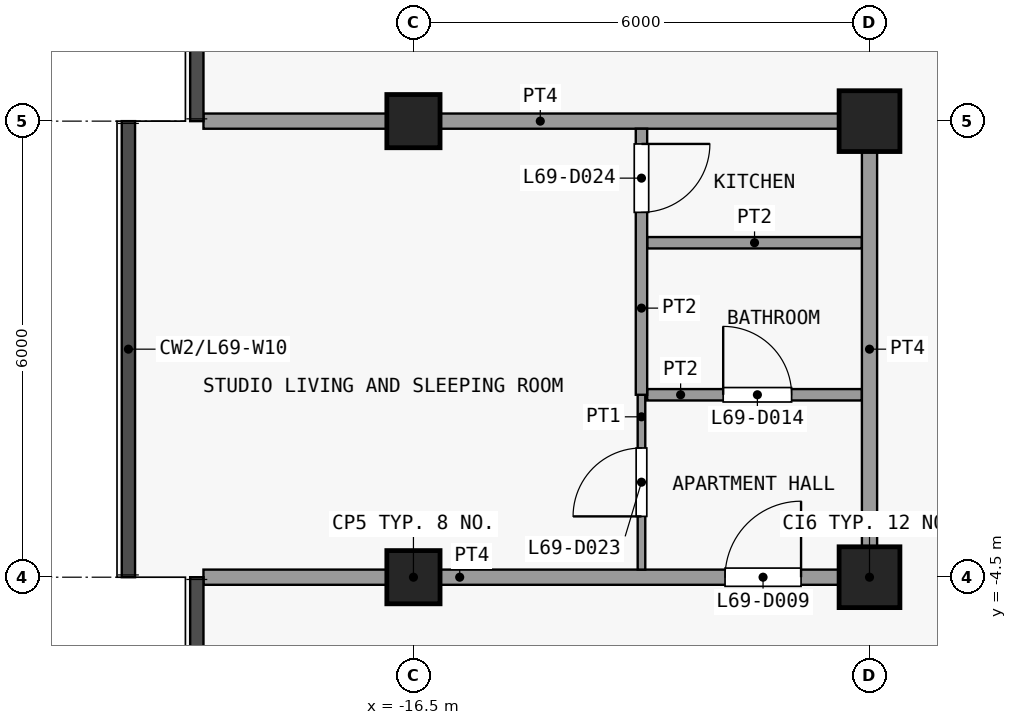
"""IFC4 building model, lengths in metres.
Left out: names, types, materials, properties, quantities, classifications, styles, units other than length and angle.
Written with IfcOpenShell. Run it as: python <this file> out.ifc"""

import sys

from ifc_helpers import new_model, si_unit, direction, frame, frame_2d, origin, origin_2d, place, context, subcontext, project, spatial, rectangle, extrude, element, fill, save


model = new_model("IFC4")
c1 = context("Model", 3, precision=1e-05, world=origin(), true_north=direction((0.0, 1.0)))
c2 = subcontext(c1, "Body", "Model", "MODEL_VIEW")
j1 = project(units=[si_unit("LENGTHUNIT", "METRE"), si_unit("PLANEANGLEUNIT", "RADIAN")], contexts=[c1])
p1 = place(None, origin())
s1 = spatial("IfcSite", under=j1, at=p1, CompositionType="ELEMENT")
p2 = place(p1, origin())
s2 = spatial("IfcBuilding", under=s1, at=p2, CompositionType="ELEMENT")
p3 = place(p2, frame((0.0, 0.0, 273.5)))
s3 = spatial("IfcBuildingStorey", under=s2, at=p3, CompositionType="ELEMENT", Elevation=273.5)
for number, where, z_axis, x_axis in (
    (1, (-16.5, -4.5, 0.0), (0.0, 0.0, 1.0), (1.0, 0.0, 0.0)),
    (2, (-16.5, 1.5, 0.0), (0.0, 0.0, 1.0), (1.0, 0.0, 0.0)),
):
    element("IfcColumn", number, at=place(p3, frame(where, z_axis=z_axis, x_axis=x_axis)), inside=s3, PredefinedType="COLUMN", context=c2, shape_type="SweptSolid", body=[
        extrude(rectangle(XDim=0.7, YDim=0.7, at=origin_2d()), origin(), (0.0, 0.0, 1.0), 3.6),
    ])
for number, where, z_axis, x_axis in (
    (3, (-10.5, -4.5, 0.0), (0.0, 0.0, 1.0), (1.0, 0.0, 0.0)),
    (4, (-10.5, 1.5, 0.0), (0.0, 0.0, 1.0), (1.0, 0.0, 0.0)),
):
    element("IfcColumn", number, at=place(p3, frame(where, z_axis=z_axis, x_axis=x_axis)), inside=s3, PredefinedType="COLUMN", context=c2, shape_type="SweptSolid", body=[
        extrude(rectangle(XDim=0.8, YDim=0.8, at=origin_2d()), origin(), (0.0, 0.0, 1.0), 3.6),
    ])
p4 = place(p3, frame((-19.262, -4.5, 0.0), z_axis=(0.0, 0.0, 1.0), x_axis=(1.0, 0.0, 0.0)))
e5 = element("IfcWall", 5, at=p4, inside=s3, PredefinedType="PARTITIONING", context=c2, shape_type="SweptSolid", body=[
    extrude(rectangle(XDim=8.863, YDim=0.2, at=frame_2d((4.431, 0.0))), origin(), (0.0, 0.0, 1.0), 3.3),
])
p5 = place(p4, frame((6.862, 0.0, 0.0)))
e6 = element("IfcOpeningElement", 6, at=p5, cuts=e5, PredefinedType="OPENING", context=c2, shape_type="SweptSolid", body=[
    extrude(rectangle(XDim=1.0, YDim=2.1, at=frame_2d((0.5, 1.05))), frame((0.0, 0.11, 0.0), z_axis=(0.0, -1.0, 0.0), x_axis=(1.0, 0.0, 0.0)), (0.0, 0.0, 1.0), 0.22),
])
p6 = place(p3, frame((-13.425, -2.1, 0.0), z_axis=(0.0, 0.0, 1.0), x_axis=(1.0, 0.0, 0.0)))
e7 = element("IfcWall", 7, at=p6, inside=s3, PredefinedType="PARTITIONING", context=c2, shape_type="SweptSolid", body=[
    extrude(rectangle(XDim=2.825, YDim=0.15, at=frame_2d((1.413, 0.0))), origin(), (0.0, 0.0, 1.0), 3.3),
])
p7 = place(p6, frame((1.0, 0.0, 0.0)))
e8 = element("IfcOpeningElement", 8, at=p7, cuts=e7, PredefinedType="OPENING", context=c2, shape_type="SweptSolid", body=[
    extrude(rectangle(XDim=0.9, YDim=2.1, at=frame_2d((0.45, 1.05))), frame((0.0, 0.085, 0.0), z_axis=(0.0, -1.0, 0.0), x_axis=(1.0, 0.0, 0.0)), (0.0, 0.0, 1.0), 0.17),
])
p8 = place(p3, frame((-13.425, -0.1, 0.0), z_axis=(0.0, 0.0, 1.0), x_axis=(1.0, 0.0, 0.0)))
e9 = element("IfcWall", 9, at=p8, inside=s3, PredefinedType="PARTITIONING", context=c2, shape_type="SweptSolid", body=[
    extrude(rectangle(XDim=2.825, YDim=0.15, at=frame_2d((1.413, 0.0))), origin(), (0.0, 0.0, 1.0), 3.3),
])
p9 = place(p3, frame((-19.262, 1.5, 0.0), z_axis=(0.0, 0.0, 1.0), x_axis=(1.0, 0.0, 0.0)))
e10 = element("IfcWall", 10, at=p9, inside=s3, PredefinedType="PARTITIONING", context=c2, shape_type="SweptSolid", body=[
    extrude(rectangle(XDim=8.863, YDim=0.2, at=frame_2d((4.431, 0.0))), origin(), (0.0, 0.0, 1.0), 3.3),
])
p10 = place(p3, frame((-13.5, -4.4, 0.0), z_axis=(0.0, 0.0, 1.0), x_axis=(0.0, 1.0, 0.0)))
e11 = element("IfcWall", 11, at=p10, inside=s3, PredefinedType="PARTITIONING", context=c2, shape_type="SweptSolid", body=[
    extrude(rectangle(XDim=2.3, YDim=0.1, at=frame_2d((1.15, 0.0))), origin(), (0.0, 0.0, 1.0), 3.3),
])
p11 = place(p10, frame((0.7, 0.0, 0.0)))
e12 = element("IfcOpeningElement", 12, at=p11, cuts=e11, PredefinedType="OPENING", context=c2, shape_type="SweptSolid", body=[
    extrude(rectangle(XDim=0.9, YDim=2.1, at=frame_2d((0.45, 1.05))), frame((0.0, 0.06, 0.0), z_axis=(0.0, -1.0, 0.0), x_axis=(1.0, 0.0, 0.0)), (0.0, 0.0, 1.0), 0.12),
])
p12 = place(p3, frame((-13.5, -2.1, 0.0), z_axis=(0.0, 0.0, 1.0), x_axis=(0.0, 1.0, 0.0)))
e13 = element("IfcWall", 13, at=p12, inside=s3, PredefinedType="PARTITIONING", context=c2, shape_type="SweptSolid", body=[
    extrude(rectangle(XDim=3.5, YDim=0.15, at=frame_2d((1.75, 0.0))), origin(), (0.0, 0.0, 1.0), 3.3),
])
p13 = place(p12, frame((2.4, 0.0, 0.0)))
e14 = element("IfcOpeningElement", 14, at=p13, cuts=e13, PredefinedType="OPENING", context=c2, shape_type="SweptSolid", body=[
    extrude(rectangle(XDim=0.9, YDim=2.1, at=frame_2d((0.45, 1.05))), frame((0.0, 0.085, 0.0), z_axis=(0.0, -1.0, 0.0), x_axis=(1.0, 0.0, 0.0)), (0.0, 0.0, 1.0), 0.17),
])
p14 = place(p3, frame((-10.5, -4.4, 0.0), z_axis=(0.0, 0.0, 1.0), x_axis=(0.0, 1.0, 0.0)))
e15 = element("IfcWall", 15, at=p14, inside=s3, PredefinedType="PARTITIONING", context=c2, shape_type="SweptSolid", body=[
    extrude(rectangle(XDim=5.8, YDim=0.2, at=frame_2d((2.9, 0.0))), origin(), (0.0, 0.0, 1.0), 3.3),
])
p15 = place(p5, origin())
e16 = element("IfcDoor", 16, at=p15, inside=s3, OperationType="SINGLE_SWING_LEFT", PredefinedType="DOOR", context=c2, shape_type="SweptSolid", body=[
    extrude(rectangle(XDim=1.0, YDim=2.1, at=frame_2d((0.5, 1.05))), frame((0.0, 0.025, 0.0), z_axis=(0.0, -1.0, 0.0), x_axis=(1.0, 0.0, 0.0)), (0.0, 0.0, 1.0), 0.05),
])
fill(e6, e16)
p16 = place(p7, origin())
e17 = element("IfcDoor", 17, at=p16, inside=s3, OperationType="SINGLE_SWING_RIGHT", PredefinedType="DOOR", context=c2, shape_type="SweptSolid", body=[
    extrude(rectangle(XDim=0.9, YDim=2.1, at=frame_2d((0.45, 1.05))), frame((0.0, 0.025, 0.0), z_axis=(0.0, -1.0, 0.0), x_axis=(1.0, 0.0, 0.0)), (0.0, 0.0, 1.0), 0.05),
])
fill(e8, e17)
p17 = place(p11, origin())
e18 = element("IfcDoor", 18, at=p17, inside=s3, OperationType="SINGLE_SWING_RIGHT", PredefinedType="DOOR", context=c2, shape_type="SweptSolid", body=[
    extrude(rectangle(XDim=0.9, YDim=2.1, at=frame_2d((0.45, 1.05))), frame((0.0, 0.025, 0.0), z_axis=(0.0, -1.0, 0.0), x_axis=(1.0, 0.0, 0.0)), (0.0, 0.0, 1.0), 0.05),
])
fill(e12, e18)
p18 = place(p13, origin())
e19 = element("IfcDoor", 19, at=p18, inside=s3, OperationType="SINGLE_SWING_RIGHT", PredefinedType="DOOR", context=c2, shape_type="SweptSolid", body=[
    extrude(rectangle(XDim=0.9, YDim=2.1, at=frame_2d((0.45, 1.05))), frame((0.0, 0.025, 0.0), z_axis=(0.0, -1.0, 0.0), x_axis=(1.0, 0.0, 0.0)), (0.0, 0.0, 1.0), 0.05),
])
fill(e14, e19)
save(model, sys.argv[1])
